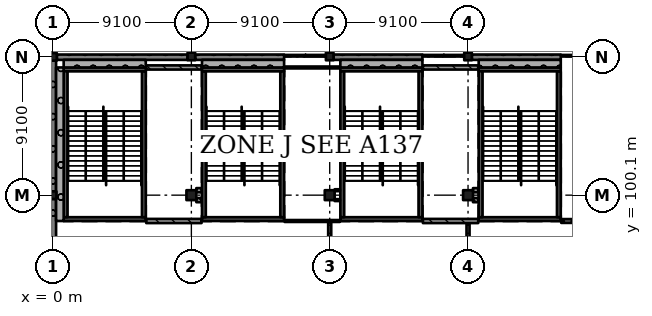
"""IFC4 building model, lengths in metres.
Left out: names, types, materials, properties, quantities, classifications, styles, units other than length and angle.
Written with IfcOpenShell. Run it as: python <this file> out.ifc"""

import sys

from ifc_helpers import new_model, si_unit, direction, frame, frame_2d, origin, origin_2d, place, context, subcontext, project, spatial, rectangle, extrude, element, fill, save


model = new_model("IFC4")
c1 = context("Model", 3, precision=1e-05, world=origin(), true_north=direction((0.0, 1.0)))
c2 = subcontext(c1, "Body", "Model", "MODEL_VIEW")
j1 = project(units=[si_unit("LENGTHUNIT", "METRE"), si_unit("PLANEANGLEUNIT", "RADIAN")], contexts=[c1])
p1 = place(None, origin())
s1 = spatial("IfcSite", under=j1, at=p1, CompositionType="ELEMENT")
p2 = place(p1, origin())
s2 = spatial("IfcBuilding", under=s1, at=p2, CompositionType="ELEMENT")
p3 = place(p2, frame((0.0, 0.0, 10.92)))
s3 = spatial("IfcBuildingStorey", under=s2, at=p3, CompositionType="ELEMENT", Elevation=10.92)
for number, where, z_axis, x_axis in (
    (1, (-0.025, 100.1, 0.0), (0.0, 0.0, 1.0), (1.0, 0.0, 0.0)),
    (2, (0.0, 109.2, 0.0), (0.0, 0.0, 1.0), (1.0, 0.0, 0.0)),
):
    element("IfcColumn", number, at=place(p3, frame(where, z_axis=z_axis, x_axis=x_axis)), inside=s3, PredefinedType="COLUMN", context=c2, shape_type="SweptSolid", body=[
        extrude(rectangle(XDim=0.5, YDim=0.5, at=origin_2d()), origin(), (0.0, 0.0, 1.0), 4.55),
    ])
p4 = place(p3, frame((9.1, 100.1, 0.0), z_axis=(0.0, 0.0, 1.0), x_axis=(1.0, 0.0, 0.0)))
e3 = element("IfcColumn", 3, at=p4, inside=s3, PredefinedType="COLUMN", context=c2, shape_type="SweptSolid", body=[
    extrude(rectangle(XDim=0.65, YDim=0.65, at=origin_2d()), origin(), (0.0, 0.0, 1.0), 4.55),
])
p5 = place(p3, frame((9.1, 109.225, 0.0), z_axis=(0.0, 0.0, 1.0), x_axis=(1.0, 0.0, 0.0)))
e4 = element("IfcColumn", 4, at=p5, inside=s3, PredefinedType="COLUMN", context=c2, shape_type="SweptSolid", body=[
    extrude(rectangle(XDim=0.5, YDim=0.5, at=origin_2d()), origin(), (0.0, 0.0, 1.0), 4.55),
])
p6 = place(p3, frame((18.2, 100.1, 0.0), z_axis=(0.0, 0.0, 1.0), x_axis=(1.0, 0.0, 0.0)))
e5 = element("IfcColumn", 5, at=p6, inside=s3, PredefinedType="COLUMN", context=c2, shape_type="SweptSolid", body=[
    extrude(rectangle(XDim=0.65, YDim=0.65, at=origin_2d()), origin(), (0.0, 0.0, 1.0), 4.55),
])
p7 = place(p3, frame((18.2, 109.225, 0.0), z_axis=(0.0, 0.0, 1.0), x_axis=(1.0, 0.0, 0.0)))
e6 = element("IfcColumn", 6, at=p7, inside=s3, PredefinedType="COLUMN", context=c2, shape_type="SweptSolid", body=[
    extrude(rectangle(XDim=0.5, YDim=0.5, at=origin_2d()), origin(), (0.0, 0.0, 1.0), 4.55),
])
p8 = place(p3, frame((27.3, 100.1, 0.0), z_axis=(0.0, 0.0, 1.0), x_axis=(1.0, 0.0, 0.0)))
e7 = element("IfcColumn", 7, at=p8, inside=s3, PredefinedType="COLUMN", context=c2, shape_type="SweptSolid", body=[
    extrude(rectangle(XDim=0.65, YDim=0.65, at=origin_2d()), origin(), (0.0, 0.0, 1.0), 4.55),
])
p9 = place(p3, frame((27.3, 109.225, 0.0), z_axis=(0.0, 0.0, 1.0), x_axis=(1.0, 0.0, 0.0)))
e8 = element("IfcColumn", 8, at=p9, inside=s3, PredefinedType="COLUMN", context=c2, shape_type="SweptSolid", body=[
    extrude(rectangle(XDim=0.5, YDim=0.5, at=origin_2d()), origin(), (0.0, 0.0, 1.0), 4.55),
])
p10 = place(p3, frame((6.1, 98.525, 0.0), z_axis=(0.0, 0.0, 1.0), x_axis=(-1.0, 0.0, 0.0)))
e9 = element("IfcWall", 9, at=p10, inside=s3, PredefinedType="SHEAR", context=c2, shape_type="SweptSolid", body=[
    extrude(rectangle(XDim=5.4, YDim=0.25, at=frame_2d((2.7, 0.0))), origin(), (0.0, 0.0, 1.0), 4.55),
])
p11 = place(p10, frame((1.5, 0.0, 0.0)))
e10 = element("IfcOpeningElement", 10, at=p11, cuts=e9, PredefinedType="OPENING", context=c2, shape_type="SweptSolid", body=[
    extrude(rectangle(XDim=2.4, YDim=2.1, at=frame_2d((1.2, 1.05))), frame((0.0, 0.135, 0.0), z_axis=(0.0, -1.0, 0.0), x_axis=(1.0, 0.0, 0.0)), (0.0, 0.0, 1.0), 0.27),
])
p12 = place(p3, frame((6.1, 108.375, 0.0), z_axis=(0.0, 0.0, 1.0), x_axis=(-1.0, 0.0, 0.0)))
e11 = element("IfcWall", 11, at=p12, inside=s3, PredefinedType="SHEAR", context=c2, shape_type="SweptSolid", body=[
    extrude(rectangle(XDim=5.4, YDim=0.25, at=frame_2d((2.7, 0.0))), origin(), (0.0, 0.0, 1.0), 4.55),
])
for number, where, z_axis, x_axis in (
    (12, (0.825, 108.25, 0.0), (0.0, 0.0, 1.0), (0.0, -1.0, 0.0)),
    (13, (5.975, 108.25, 0.0), (0.0, 0.0, 1.0), (0.0, -1.0, 0.0)),
):
    element("IfcWall", number, at=place(p3, frame(where, z_axis=z_axis, x_axis=x_axis)), inside=s3, PredefinedType="SHEAR", context=c2, shape_type="SweptSolid", body=[
        extrude(rectangle(XDim=9.6, YDim=0.25, at=frame_2d((4.8, 0.0))), origin(), (0.0, 0.0, 1.0), 4.55),
    ])
p13 = place(p3, frame((15.2, 98.525, 0.0), z_axis=(0.0, 0.0, 1.0), x_axis=(-1.0, 0.0, 0.0)))
e14 = element("IfcWall", 14, at=p13, inside=s3, PredefinedType="SHEAR", context=c2, shape_type="SweptSolid", body=[
    extrude(rectangle(XDim=5.4, YDim=0.25, at=frame_2d((2.7, 0.0))), origin(), (0.0, 0.0, 1.0), 4.55),
])
p14 = place(p13, frame((1.5, 0.0, 0.0)))
e15 = element("IfcOpeningElement", 15, at=p14, cuts=e14, PredefinedType="OPENING", context=c2, shape_type="SweptSolid", body=[
    extrude(rectangle(XDim=2.4, YDim=2.1, at=frame_2d((1.2, 1.05))), frame((0.0, 0.135, 0.0), z_axis=(0.0, -1.0, 0.0), x_axis=(1.0, 0.0, 0.0)), (0.0, 0.0, 1.0), 0.27),
])
p15 = place(p3, frame((15.2, 108.375, 0.0), z_axis=(0.0, 0.0, 1.0), x_axis=(-1.0, 0.0, 0.0)))
e16 = element("IfcWall", 16, at=p15, inside=s3, PredefinedType="SHEAR", context=c2, shape_type="SweptSolid", body=[
    extrude(rectangle(XDim=5.4, YDim=0.25, at=frame_2d((2.7, 0.0))), origin(), (0.0, 0.0, 1.0), 4.55),
])
for number, where, z_axis, x_axis in (
    (17, (9.925, 108.25, 0.0), (0.0, 0.0, 1.0), (0.0, -1.0, 0.0)),
    (18, (15.075, 108.25, 0.0), (0.0, 0.0, 1.0), (0.0, -1.0, 0.0)),
):
    element("IfcWall", number, at=place(p3, frame(where, z_axis=z_axis, x_axis=x_axis)), inside=s3, PredefinedType="SHEAR", context=c2, shape_type="SweptSolid", body=[
        extrude(rectangle(XDim=9.6, YDim=0.25, at=frame_2d((4.8, 0.0))), origin(), (0.0, 0.0, 1.0), 4.55),
    ])
p16 = place(p3, frame((24.3, 98.525, 0.0), z_axis=(0.0, 0.0, 1.0), x_axis=(-1.0, 0.0, 0.0)))
e19 = element("IfcWall", 19, at=p16, inside=s3, PredefinedType="SHEAR", context=c2, shape_type="SweptSolid", body=[
    extrude(rectangle(XDim=5.4, YDim=0.25, at=frame_2d((2.7, 0.0))), origin(), (0.0, 0.0, 1.0), 4.55),
])
p17 = place(p16, frame((1.5, 0.0, 0.0)))
e20 = element("IfcOpeningElement", 20, at=p17, cuts=e19, PredefinedType="OPENING", context=c2, shape_type="SweptSolid", body=[
    extrude(rectangle(XDim=2.4, YDim=2.1, at=frame_2d((1.2, 1.05))), frame((0.0, 0.135, 0.0), z_axis=(0.0, -1.0, 0.0), x_axis=(1.0, 0.0, 0.0)), (0.0, 0.0, 1.0), 0.27),
])
p18 = place(p3, frame((24.3, 108.375, 0.0), z_axis=(0.0, 0.0, 1.0), x_axis=(-1.0, 0.0, 0.0)))
e21 = element("IfcWall", 21, at=p18, inside=s3, PredefinedType="SHEAR", context=c2, shape_type="SweptSolid", body=[
    extrude(rectangle(XDim=5.4, YDim=0.25, at=frame_2d((2.7, 0.0))), origin(), (0.0, 0.0, 1.0), 4.55),
])
for number, where, z_axis, x_axis in (
    (22, (19.025, 108.25, 0.0), (0.0, 0.0, 1.0), (0.0, -1.0, 0.0)),
    (23, (24.175, 108.25, 0.0), (0.0, 0.0, 1.0), (0.0, -1.0, 0.0)),
):
    element("IfcWall", number, at=place(p3, frame(where, z_axis=z_axis, x_axis=x_axis)), inside=s3, PredefinedType="SHEAR", context=c2, shape_type="SweptSolid", body=[
        extrude(rectangle(XDim=9.6, YDim=0.25, at=frame_2d((4.8, 0.0))), origin(), (0.0, 0.0, 1.0), 4.55),
    ])
p19 = place(p3, frame((33.4, 98.525, 0.0), z_axis=(0.0, 0.0, 1.0), x_axis=(-1.0, 0.0, 0.0)))
e24 = element("IfcWall", 24, at=p19, inside=s3, PredefinedType="SHEAR", context=c2, shape_type="SweptSolid", body=[
    extrude(rectangle(XDim=5.4, YDim=0.25, at=frame_2d((2.7, 0.0))), origin(), (0.0, 0.0, 1.0), 4.55),
])
p20 = place(p19, frame((1.5, 0.0, 0.0)))
e25 = element("IfcOpeningElement", 25, at=p20, cuts=e24, PredefinedType="OPENING", context=c2, shape_type="SweptSolid", body=[
    extrude(rectangle(XDim=2.4, YDim=2.1, at=frame_2d((1.2, 1.05))), frame((0.0, 0.135, 0.0), z_axis=(0.0, -1.0, 0.0), x_axis=(1.0, 0.0, 0.0)), (0.0, 0.0, 1.0), 0.27),
])
p21 = place(p3, frame((33.4, 108.375, 0.0), z_axis=(0.0, 0.0, 1.0), x_axis=(-1.0, 0.0, 0.0)))
e26 = element("IfcWall", 26, at=p21, inside=s3, PredefinedType="SHEAR", context=c2, shape_type="SweptSolid", body=[
    extrude(rectangle(XDim=5.4, YDim=0.25, at=frame_2d((2.7, 0.0))), origin(), (0.0, 0.0, 1.0), 4.55),
])
for number, where, z_axis, x_axis in (
    (27, (28.125, 108.25, 0.0), (0.0, 0.0, 1.0), (0.0, -1.0, 0.0)),
    (28, (33.275, 108.25, 0.0), (0.0, 0.0, 1.0), (0.0, -1.0, 0.0)),
):
    element("IfcWall", number, at=place(p3, frame(where, z_axis=z_axis, x_axis=x_axis)), inside=s3, PredefinedType="SHEAR", context=c2, shape_type="SweptSolid", body=[
        extrude(rectangle(XDim=9.6, YDim=0.25, at=frame_2d((4.8, 0.0))), origin(), (0.0, 0.0, 1.0), 4.55),
    ])
p22 = place(p3, frame((33.4, 109.175, 0.0), z_axis=(0.0, 0.0, 1.0), x_axis=(-1.0, 0.0, 0.0)))
e29 = element("IfcWall", 29, at=p22, inside=s3, PredefinedType="SOLIDWALL", context=c2, shape_type="SweptSolid", body=[
    extrude(rectangle(XDim=5.85, YDim=0.35, at=frame_2d((2.925, 0.0))), origin(), (0.0, 0.0, 1.0), 3.5),
])
p23 = place(p3, frame((24.3, 109.175, 0.0), z_axis=(0.0, 0.0, 1.0), x_axis=(-1.0, 0.0, 0.0)))
e30 = element("IfcWall", 30, at=p23, inside=s3, PredefinedType="SOLIDWALL", context=c2, shape_type="SweptSolid", body=[
    extrude(rectangle(XDim=5.85, YDim=0.35, at=frame_2d((2.925, 0.0))), origin(), (0.0, 0.0, 1.0), 3.5),
])
p24 = place(p3, frame((15.2, 109.175, 0.0), z_axis=(0.0, 0.0, 1.0), x_axis=(-1.0, 0.0, 0.0)))
e31 = element("IfcWall", 31, at=p24, inside=s3, PredefinedType="SOLIDWALL", context=c2, shape_type="SweptSolid", body=[
    extrude(rectangle(XDim=5.85, YDim=0.35, at=frame_2d((2.925, 0.0))), origin(), (0.0, 0.0, 1.0), 3.5),
])
p25 = place(p3, frame((8.85, 109.175, 0.0), z_axis=(0.0, 0.0, 1.0), x_axis=(-1.0, 0.0, 0.0)))
e32 = element("IfcWall", 32, at=p25, inside=s3, PredefinedType="SOLIDWALL", context=c2, shape_type="SweptSolid", body=[
    extrude(rectangle(XDim=8.6, YDim=0.35, at=frame_2d((4.3, 0.0))), origin(), (0.0, 0.0, 1.0), 3.5),
])
p26 = place(p3, frame((0.025, 108.95, 0.0), z_axis=(0.0, 0.0, 1.0), x_axis=(0.0, -1.0, 0.0)))
e33 = element("IfcWall", 33, at=p26, inside=s3, PredefinedType="SOLIDWALL", context=c2, shape_type="SweptSolid", body=[
    extrude(rectangle(XDim=8.6, YDim=0.35, at=frame_2d((4.3, 0.0))), origin(), (0.0, 0.0, 1.0), 3.5),
])
p27 = place(p3, frame((0.025, 99.85, 0.0), z_axis=(0.0, 0.0, 1.0), x_axis=(0.0, -1.0, 0.0)))
e34 = element("IfcWall", 34, at=p27, inside=s3, PredefinedType="SOLIDWALL", context=c2, shape_type="SweptSolid", body=[
    extrude(rectangle(XDim=8.55, YDim=0.35, at=frame_2d((4.275, 0.0))), origin(), (0.0, 0.0, 1.0), 3.5),
])
p28 = place(p3, frame((0.7, 108.75, 0.0), z_axis=(0.0, 0.0, 1.0), x_axis=(1.0, 0.0, 0.0)))
e35 = element("IfcWall", 35, at=p28, inside=s3, PredefinedType="SOLIDWALL", context=c2, shape_type="SweptSolid", body=[
    extrude(rectangle(XDim=5.4, YDim=0.5, at=frame_2d((2.7, 0.0))), origin(), (0.0, 0.0, 1.0), 4.55),
])
p29 = place(p3, frame((0.45, 98.4, 0.0), z_axis=(0.0, 0.0, 1.0), x_axis=(0.0, 1.0, 0.0)))
e36 = element("IfcWall", 36, at=p29, inside=s3, PredefinedType="SOLIDWALL", context=c2, shape_type="SweptSolid", body=[
    extrude(rectangle(XDim=10.1, YDim=0.5, at=frame_2d((5.05, 0.0))), origin(), (0.0, 0.0, 1.0), 4.25),
])
p30 = place(p3, frame((9.8, 108.75, 0.0), z_axis=(0.0, 0.0, 1.0), x_axis=(1.0, 0.0, 0.0)))
e37 = element("IfcWall", 37, at=p30, inside=s3, PredefinedType="SOLIDWALL", context=c2, shape_type="SweptSolid", body=[
    extrude(rectangle(XDim=5.4, YDim=0.5, at=frame_2d((2.7, 0.0))), origin(), (0.0, 0.0, 1.0), 4.55),
])
p31 = place(p3, frame((18.9, 108.75, 0.0), z_axis=(0.0, 0.0, 1.0), x_axis=(1.0, 0.0, 0.0)))
e38 = element("IfcWall", 38, at=p31, inside=s3, PredefinedType="SOLIDWALL", context=c2, shape_type="SweptSolid", body=[
    extrude(rectangle(XDim=5.4, YDim=0.5, at=frame_2d((2.7, 0.0))), origin(), (0.0, 0.0, 1.0), 4.55),
])
p32 = place(p3, frame((28.0, 108.75, 0.0), z_axis=(0.0, 0.0, 1.0), x_axis=(1.0, 0.0, 0.0)))
e39 = element("IfcWall", 39, at=p32, inside=s3, PredefinedType="SOLIDWALL", context=c2, shape_type="SweptSolid", body=[
    extrude(rectangle(XDim=5.4, YDim=0.5, at=frame_2d((2.7, 0.0))), origin(), (0.0, 0.0, 1.0), 4.55),
])
p33 = place(p3, frame((6.13, 98.4, 0.0), z_axis=(0.0, 0.0, 1.0), x_axis=(1.0, 0.0, 0.0)))
e40 = element("IfcWall", 40, at=p33, inside=s3, PredefinedType="SOLIDWALL", context=c2, shape_type="SweptSolid", body=[
    extrude(rectangle(XDim=3.64, YDim=0.275, at=frame_2d((1.82, 0.0))), origin(), (0.0, 0.0, 1.0), 4.25),
])
p34 = place(p33, frame((1.25, 0.0, 0.0)))
e41 = element("IfcOpeningElement", 41, at=p34, cuts=e40, PredefinedType="OPENING", context=c2, shape_type="SweptSolid", body=[
    extrude(rectangle(XDim=1.2, YDim=2.4, at=frame_2d((0.6, 1.2))), frame((0.0, 0.147, 0.0), z_axis=(0.0, -1.0, 0.0), x_axis=(1.0, 0.0, 0.0)), (0.0, 0.0, 1.0), 0.295),
])
p35 = place(p3, frame((6.13, 108.5, 0.0), z_axis=(0.0, 0.0, 1.0), x_axis=(1.0, 0.0, 0.0)))
e42 = element("IfcWall", 42, at=p35, inside=s3, PredefinedType="SOLIDWALL", context=c2, shape_type="SweptSolid", body=[
    extrude(rectangle(XDim=3.64, YDim=0.275, at=frame_2d((1.82, 0.0))), origin(), (0.0, 0.0, 1.0), 4.25),
])
for number, where, z_axis, x_axis in (
    (43, (9.425, 99.775, 0.0), (0.0, 0.0, 1.0), (1.0, 0.0, 0.0)),
    (44, (9.77, 100.425, 0.0), (0.0, 0.0, 1.0), (-1.0, 0.0, 0.0)),
):
    element("IfcWall", number, at=place(p3, frame(where, z_axis=z_axis, x_axis=x_axis)), inside=s3, PredefinedType="SOLIDWALL", context=c2, shape_type="SweptSolid", body=[
        extrude(rectangle(XDim=0.345, YDim=0.275, at=frame_2d((0.172, 0.0))), origin(), (0.0, 0.0, 1.0), 4.25),
    ])
p36 = place(p3, frame((15.23, 98.4, 0.0), z_axis=(0.0, 0.0, 1.0), x_axis=(1.0, 0.0, 0.0)))
e45 = element("IfcWall", 45, at=p36, inside=s3, PredefinedType="PARTITIONING", context=c2, shape_type="SweptSolid", body=[
    extrude(rectangle(XDim=3.64, YDim=0.125, at=frame_2d((1.82, 0.0))), origin(), (0.0, 0.0, 1.0), 4.25),
])
p37 = place(p36, frame((1.05, 0.0, 0.0)))
e46 = element("IfcOpeningElement", 46, at=p37, cuts=e45, PredefinedType="OPENING", context=c2, shape_type="SweptSolid", body=[
    extrude(rectangle(XDim=0.9, YDim=2.1, at=frame_2d((0.45, 1.05))), frame((0.0, 0.073, 0.0), z_axis=(0.0, -1.0, 0.0), x_axis=(1.0, 0.0, 0.0)), (0.0, 0.0, 1.0), 0.145),
])
p38 = place(p3, frame((15.23, 108.5, 0.0), z_axis=(0.0, 0.0, 1.0), x_axis=(1.0, 0.0, 0.0)))
e47 = element("IfcWall", 47, at=p38, inside=s3, PredefinedType="PARTITIONING", context=c2, shape_type="SweptSolid", body=[
    extrude(rectangle(XDim=3.64, YDim=0.125, at=frame_2d((1.82, 0.0))), origin(), (0.0, 0.0, 1.0), 4.25),
])
p39 = place(p3, frame((18.2, 98.337, 0.0), z_axis=(0.0, 0.0, 1.0), x_axis=(0.0, -1.0, 0.0)))
e48 = element("IfcWall", 48, at=p39, inside=s3, PredefinedType="PARTITIONING", context=c2, shape_type="SweptSolid", body=[
    extrude(rectangle(XDim=6.938, YDim=0.2, at=frame_2d((3.469, 0.0))), origin(), (0.0, 0.0, 1.0), 3.55),
])
p40 = place(p39, frame((0.85, 0.0, 0.0)))
e49 = element("IfcOpeningElement", 49, at=p40, cuts=e48, PredefinedType="OPENING", context=c2, shape_type="SweptSolid", body=[
    extrude(rectangle(XDim=1.8, YDim=2.4, at=frame_2d((0.9, 1.2))), frame((0.0, 0.11, 0.0), z_axis=(0.0, -1.0, 0.0), x_axis=(1.0, 0.0, 0.0)), (0.0, 0.0, 1.0), 0.22),
])
p41 = place(p39, frame((4.35, 0.0, 0.0)))
e50 = element("IfcOpeningElement", 50, at=p41, cuts=e48, PredefinedType="OPENING", context=c2, shape_type="SweptSolid", body=[
    extrude(rectangle(XDim=1.8, YDim=2.4, at=frame_2d((0.9, 1.2))), frame((0.0, 0.11, 0.0), z_axis=(0.0, -1.0, 0.0), x_axis=(1.0, 0.0, 0.0)), (0.0, 0.0, 1.0), 0.22),
])
for number, where, z_axis, x_axis in (
    (51, (18.525, 99.775, 0.0), (0.0, 0.0, 1.0), (1.0, 0.0, 0.0)),
    (52, (18.87, 100.425, 0.0), (0.0, 0.0, 1.0), (-1.0, 0.0, 0.0)),
):
    element("IfcWall", number, at=place(p3, frame(where, z_axis=z_axis, x_axis=x_axis)), inside=s3, PredefinedType="PARTITIONING", context=c2, shape_type="SweptSolid", body=[
        extrude(rectangle(XDim=0.345, YDim=0.125, at=frame_2d((0.173, 0.0))), origin(), (0.0, 0.0, 1.0), 4.25),
    ])
p42 = place(p3, frame((24.33, 98.4, 0.0), z_axis=(0.0, 0.0, 1.0), x_axis=(1.0, 0.0, 0.0)))
e53 = element("IfcWall", 53, at=p42, inside=s3, PredefinedType="SOLIDWALL", context=c2, shape_type="SweptSolid", body=[
    extrude(rectangle(XDim=3.64, YDim=0.275, at=frame_2d((1.82, 0.0))), origin(), (0.0, 0.0, 1.0), 4.25),
])
p43 = place(p42, frame((0.85, 0.0, 0.0)))
e54 = element("IfcOpeningElement", 54, at=p43, cuts=e53, PredefinedType="OPENING", context=c2, shape_type="SweptSolid", body=[
    extrude(rectangle(XDim=1.2, YDim=2.4, at=frame_2d((0.6, 1.2))), frame((0.0, 0.147, 0.0), z_axis=(0.0, -1.0, 0.0), x_axis=(1.0, 0.0, 0.0)), (0.0, 0.0, 1.0), 0.295),
])
p44 = place(p3, frame((24.33, 108.5, 0.0), z_axis=(0.0, 0.0, 1.0), x_axis=(1.0, 0.0, 0.0)))
e55 = element("IfcWall", 55, at=p44, inside=s3, PredefinedType="SOLIDWALL", context=c2, shape_type="SweptSolid", body=[
    extrude(rectangle(XDim=3.64, YDim=0.275, at=frame_2d((1.82, 0.0))), origin(), (0.0, 0.0, 1.0), 4.25),
])
p45 = place(p3, frame((27.3, 98.262, 0.0), z_axis=(0.0, 0.0, 1.0), x_axis=(0.0, -1.0, 0.0)))
e56 = element("IfcWall", 56, at=p45, inside=s3, PredefinedType="PARTITIONING", context=c2, shape_type="SweptSolid", body=[
    extrude(rectangle(XDim=6.863, YDim=0.2, at=frame_2d((3.431, 0.0))), origin(), (0.0, 0.0, 1.0), 3.55),
])
p46 = place(p45, frame((0.85, 0.0, 0.0)))
e57 = element("IfcOpeningElement", 57, at=p46, cuts=e56, PredefinedType="OPENING", context=c2, shape_type="SweptSolid", body=[
    extrude(rectangle(XDim=1.8, YDim=2.4, at=frame_2d((0.9, 1.2))), frame((0.0, 0.11, 0.0), z_axis=(0.0, -1.0, 0.0), x_axis=(1.0, 0.0, 0.0)), (0.0, 0.0, 1.0), 0.22),
])
p47 = place(p45, frame((4.25, 0.0, 0.0)))
e58 = element("IfcOpeningElement", 58, at=p47, cuts=e56, PredefinedType="OPENING", context=c2, shape_type="SweptSolid", body=[
    extrude(rectangle(XDim=1.8, YDim=2.4, at=frame_2d((0.9, 1.2))), frame((0.0, 0.11, 0.0), z_axis=(0.0, -1.0, 0.0), x_axis=(1.0, 0.0, 0.0)), (0.0, 0.0, 1.0), 0.22),
])
for number, where, z_axis, x_axis in (
    (59, (27.625, 99.775, 0.0), (0.0, 0.0, 1.0), (1.0, 0.0, 0.0)),
    (60, (27.97, 100.425, 0.0), (0.0, 0.0, 1.0), (-1.0, 0.0, 0.0)),
):
    element("IfcWall", number, at=place(p3, frame(where, z_axis=z_axis, x_axis=x_axis)), inside=s3, PredefinedType="SOLIDWALL", context=c2, shape_type="SweptSolid", body=[
        extrude(rectangle(XDim=0.345, YDim=0.275, at=frame_2d((0.172, 0.0))), origin(), (0.0, 0.0, 1.0), 4.25),
    ])
p48 = place(p3, frame((33.43, 98.4, 0.0), z_axis=(0.0, 0.0, 1.0), x_axis=(1.0, 0.0, 0.0)))
e61 = element("IfcWall", 61, at=p48, inside=s3, PredefinedType="SOLIDWALL", context=c2, shape_type="SweptSolid", body=[
    extrude(rectangle(XDim=2.72, YDim=0.25, at=frame_2d((1.36, 0.0))), origin(), (0.0, 0.0, 1.0), 4.25),
])
p49 = place(p34, origin())
e62 = element("IfcDoor", 62, at=p49, inside=s3, OperationType="SINGLE_SWING_LEFT", PredefinedType="DOOR", context=c2, shape_type="SweptSolid", body=[
    extrude(rectangle(XDim=1.2, YDim=2.4, at=frame_2d((0.6, 1.2))), frame((0.0, 0.025, 0.0), z_axis=(0.0, -1.0, 0.0), x_axis=(1.0, 0.0, 0.0)), (0.0, 0.0, 1.0), 0.05),
])
fill(e41, e62)
p50 = place(p37, origin())
e63 = element("IfcDoor", 63, at=p50, inside=s3, OperationType="SINGLE_SWING_LEFT", PredefinedType="DOOR", context=c2, shape_type="SweptSolid", body=[
    extrude(rectangle(XDim=0.9, YDim=2.1, at=frame_2d((0.45, 1.05))), frame((0.0, 0.025, 0.0), z_axis=(0.0, -1.0, 0.0), x_axis=(1.0, 0.0, 0.0)), (0.0, 0.0, 1.0), 0.05),
])
fill(e46, e63)
p51 = place(p43, origin())
e64 = element("IfcDoor", 64, at=p51, inside=s3, OperationType="SINGLE_SWING_RIGHT", PredefinedType="DOOR", context=c2, shape_type="SweptSolid", body=[
    extrude(rectangle(XDim=1.2, YDim=2.4, at=frame_2d((0.6, 1.2))), frame((0.0, 0.025, 0.0), z_axis=(0.0, -1.0, 0.0), x_axis=(1.0, 0.0, 0.0)), (0.0, 0.0, 1.0), 0.05),
])
fill(e54, e64)
p52 = place(p40, origin())
e65 = element("IfcDoor", 65, at=p52, inside=s3, OperationType="DOUBLE_DOOR_SINGLE_SWING", PredefinedType="DOOR", context=c2, shape_type="SweptSolid", body=[
    extrude(rectangle(XDim=1.8, YDim=2.4, at=frame_2d((0.9, 1.2))), frame((0.0, 0.025, 0.0), z_axis=(0.0, -1.0, 0.0), x_axis=(1.0, 0.0, 0.0)), (0.0, 0.0, 1.0), 0.05),
])
fill(e49, e65)
p53 = place(p46, origin())
e66 = element("IfcDoor", 66, at=p53, inside=s3, OperationType="DOUBLE_DOOR_SINGLE_SWING", PredefinedType="DOOR", context=c2, shape_type="SweptSolid", body=[
    extrude(rectangle(XDim=1.8, YDim=2.4, at=frame_2d((0.9, 1.2))), frame((0.0, 0.025, 0.0), z_axis=(0.0, -1.0, 0.0), x_axis=(1.0, 0.0, 0.0)), (0.0, 0.0, 1.0), 0.05),
])
fill(e57, e66)
p54 = place(p11, origin())
e67 = element("IfcDoor", 67, at=p54, inside=s3, OperationType="DOUBLE_DOOR_SINGLE_SWING", PredefinedType="DOOR", context=c2, shape_type="SweptSolid", body=[
    extrude(rectangle(XDim=2.4, YDim=2.1, at=frame_2d((1.2, 1.05))), frame((0.0, 0.025, 0.0), z_axis=(0.0, -1.0, 0.0), x_axis=(1.0, 0.0, 0.0)), (0.0, 0.0, 1.0), 0.05),
])
fill(e10, e67)
p55 = place(p14, origin())
e68 = element("IfcDoor", 68, at=p55, inside=s3, OperationType="DOUBLE_DOOR_SINGLE_SWING", PredefinedType="DOOR", context=c2, shape_type="SweptSolid", body=[
    extrude(rectangle(XDim=2.4, YDim=2.1, at=frame_2d((1.2, 1.05))), frame((0.0, 0.025, 0.0), z_axis=(0.0, -1.0, 0.0), x_axis=(1.0, 0.0, 0.0)), (0.0, 0.0, 1.0), 0.05),
])
fill(e15, e68)
p56 = place(p17, origin())
e69 = element("IfcDoor", 69, at=p56, inside=s3, OperationType="DOUBLE_DOOR_SINGLE_SWING", PredefinedType="DOOR", context=c2, shape_type="SweptSolid", body=[
    extrude(rectangle(XDim=2.4, YDim=2.1, at=frame_2d((1.2, 1.05))), frame((0.0, 0.025, 0.0), z_axis=(0.0, -1.0, 0.0), x_axis=(1.0, 0.0, 0.0)), (0.0, 0.0, 1.0), 0.05),
])
fill(e20, e69)
p57 = place(p20, origin())
e70 = element("IfcDoor", 70, at=p57, inside=s3, OperationType="DOUBLE_DOOR_SINGLE_SWING", PredefinedType="DOOR", context=c2, shape_type="SweptSolid", body=[
    extrude(rectangle(XDim=2.4, YDim=2.1, at=frame_2d((1.2, 1.05))), frame((0.0, 0.025, 0.0), z_axis=(0.0, -1.0, 0.0), x_axis=(1.0, 0.0, 0.0)), (0.0, 0.0, 1.0), 0.05),
])
fill(e25, e70)
save(model, sys.argv[1])
